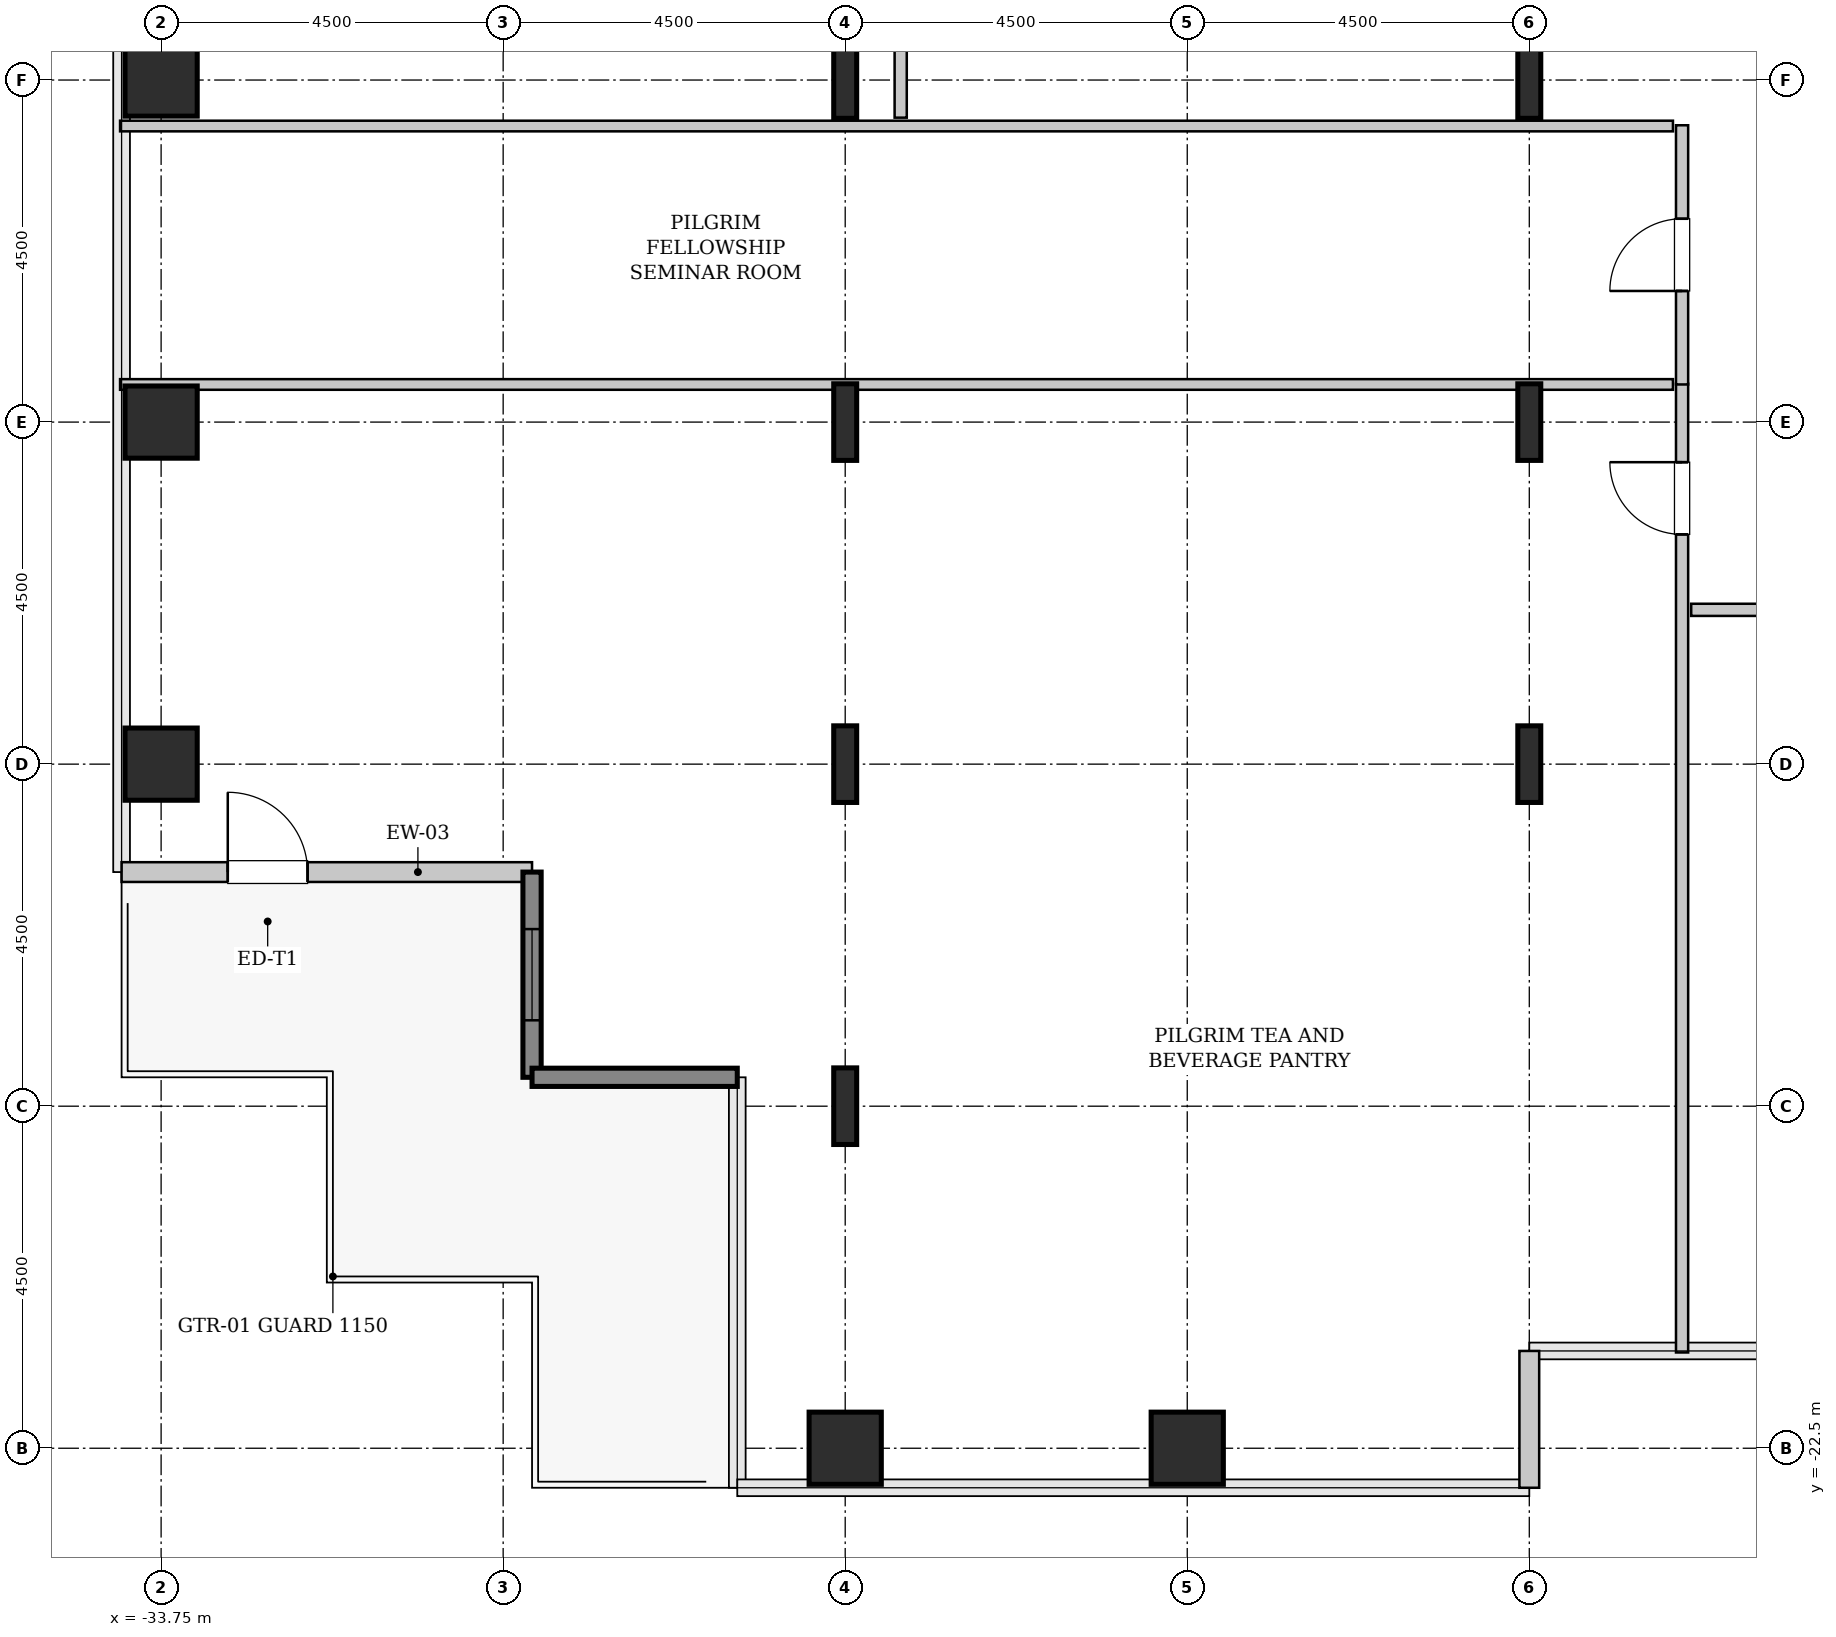
"""IFC4 building model, lengths in metres.
Left out: names, types, materials, properties, quantities, classifications, styles, units other than length and angle.
Written with IfcOpenShell. Run it as: python <this file> out.ifc"""

import sys

from ifc_helpers import new_model, si_unit, direction, frame, frame_2d, origin, origin_2d, place, context, subcontext, project, spatial, rectangle, hollow_rectangle, i_section, extrude, source, transform, mapped, element, fill, save


model = new_model("IFC4")
c1 = context("Model", 3, precision=1e-05, world=origin(), true_north=direction((0.0, 1.0)))
c2 = subcontext(c1, "Body", "Model", "MODEL_VIEW")
j1 = project(units=[si_unit("LENGTHUNIT", "METRE"), si_unit("PLANEANGLEUNIT", "RADIAN")], contexts=[c1])
p1 = place(None, origin())
s1 = spatial("IfcSite", under=j1, at=p1, CompositionType="ELEMENT")
p2 = place(p1, origin())
s2 = spatial("IfcBuilding", under=s1, at=p2, CompositionType="ELEMENT")
p3 = place(p2, frame((0.0, 0.0, 48.2)))
s3 = spatial("IfcBuildingStorey", under=s2, at=p3, CompositionType="ELEMENT", Elevation=48.2)
m1 = source(origin(), c2, "Body", "SweptSolid", [
    extrude(hollow_rectangle(XDim=0.95, YDim=0.95, WallThickness=0.045, InnerFilletRadius=0.045, OuterFilletRadius=0.09, at=origin_2d()), origin(), (0.0, 0.0, 1.0), 3.8),
])
for number, where, z_axis, x_axis in (
    (1, (-33.75, -13.5, 0.0), (0.0, 0.0, 1.0), (1.0, 0.0, 0.0)),
    (2, (-33.75, -9.0, 0.0), (0.0, 0.0, 1.0), (1.0, 0.0, 0.0)),
    (3, (-33.75, -4.5, 0.0), (0.0, 0.0, 1.0), (1.0, 0.0, 0.0)),
    (4, (-24.75, -22.5, 0.0), (0.0, 0.0, 1.0), (1.0, 0.0, 0.0)),
):
    element("IfcColumn", number, at=place(p3, frame(where, z_axis=z_axis, x_axis=x_axis)), inside=s3, PredefinedType="COLUMN", context=c2, shape_type="MappedRepresentation", body=[
        mapped(m1, transform((0.0, 0.0, 0.0), x_axis=(1.0, 0.0, 0.0), y_axis=(0.0, 1.0, 0.0), z_axis=(0.0, 0.0, 1.0), scale=1.0)),
    ])
m2 = source(origin(), c2, "Body", "SweptSolid", [
    extrude(i_section(OverallWidth=0.302, OverallDepth=1.008, WebThickness=0.021, FlangeThickness=0.04, FilletRadius=0.03, at=origin_2d()), origin(), (0.0, 0.0, 1.0), 3.8),
])
for number, where, z_axis, x_axis in (
    (5, (-24.75, -18.0, 0.0), (0.0, 0.0, 1.0), (1.0, 0.0, 0.0)),
    (6, (-24.75, -13.5, 0.0), (0.0, 0.0, 1.0), (1.0, 0.0, 0.0)),
    (7, (-24.75, -9.0, 0.0), (0.0, 0.0, 1.0), (1.0, 0.0, 0.0)),
    (8, (-24.75, -4.5, 0.0), (0.0, 0.0, 1.0), (1.0, 0.0, 0.0)),
):
    element("IfcColumn", number, at=place(p3, frame(where, z_axis=z_axis, x_axis=x_axis)), inside=s3, PredefinedType="COLUMN", context=c2, shape_type="MappedRepresentation", body=[
        mapped(m2, transform((0.0, 0.0, 0.0), x_axis=(1.0, 0.0, 0.0), y_axis=(0.0, 1.0, 0.0), z_axis=(0.0, 0.0, 1.0), scale=1.0)),
    ])
p4 = place(p3, frame((-20.25, -22.5, 0.0), z_axis=(0.0, 0.0, 1.0), x_axis=(1.0, 0.0, 0.0)))
e9 = element("IfcColumn", 9, at=p4, inside=s3, PredefinedType="COLUMN", context=c2, shape_type="MappedRepresentation", body=[
    mapped(m1, transform((0.0, 0.0, 0.0), x_axis=(1.0, 0.0, 0.0), y_axis=(0.0, 1.0, 0.0), z_axis=(0.0, 0.0, 1.0), scale=1.0)),
])
for number, where, z_axis, x_axis in (
    (10, (-15.75, -13.5, 0.0), (0.0, 0.0, 1.0), (1.0, 0.0, 0.0)),
    (11, (-15.75, -9.0, 0.0), (0.0, 0.0, 1.0), (1.0, 0.0, 0.0)),
    (12, (-15.75, -4.5, 0.0), (0.0, 0.0, 1.0), (1.0, 0.0, 0.0)),
):
    element("IfcColumn", number, at=place(p3, frame(where, z_axis=z_axis, x_axis=x_axis)), inside=s3, PredefinedType="COLUMN", context=c2, shape_type="MappedRepresentation", body=[
        mapped(m2, transform((0.0, 0.0, 0.0), x_axis=(1.0, 0.0, 0.0), y_axis=(0.0, 1.0, 0.0), z_axis=(0.0, 0.0, 1.0), scale=1.0)),
    ])
m3 = source(origin(), c2, "Body", "SweptSolid", [
    extrude(rectangle(XDim=5.4, YDim=0.26, at=frame_2d((2.7, 0.0))), origin(), (0.0, 0.0, 1.0), 3.55),
])
p5 = place(p3, frame((-34.27, -14.92, 0.0), z_axis=(0.0, 0.0, 1.0), x_axis=(1.0, 0.0, 0.0)))
e13 = element("IfcWall", 13, at=p5, inside=s3, PredefinedType="SOLIDWALL", context=c2, shape_type="MappedRepresentation", body=[
    mapped(m3, transform((0.0, 0.0, 0.0), x_axis=(1.0, 0.0, 0.0), y_axis=(0.0, 1.0, 0.0), z_axis=(0.0, 0.0, 1.0), scale=1.0)),
])
p6 = place(p5, frame((1.397, 0.0, 0.0)))
e14 = element("IfcOpeningElement", 14, at=p6, cuts=e13, PredefinedType="OPENING", context=c2, shape_type="SweptSolid", body=[
    extrude(rectangle(XDim=1.05, YDim=2.2, at=frame_2d((0.525, 1.1))), frame((0.0, 0.14, 0.0), z_axis=(0.0, -1.0, 0.0), x_axis=(1.0, 0.0, 0.0)), (0.0, 0.0, 1.0), 0.28),
])
m4 = source(origin(), c2, "Body", "SweptSolid", [
    extrude(rectangle(XDim=2.7, YDim=0.24, at=frame_2d((1.35, 0.0))), origin(), (0.0, 0.0, 1.0), 3.55),
])
p7 = place(p3, frame((-28.87, -14.92, 0.0), z_axis=(0.0, 0.0, 1.0), x_axis=(0.0, -1.0, 0.0)))
e15 = element("IfcWall", 15, at=p7, inside=s3, PredefinedType="SHEAR", context=c2, shape_type="MappedRepresentation", body=[
    mapped(m4, transform((0.0, 0.0, 0.0), x_axis=(1.0, 0.0, 0.0), y_axis=(0.0, 1.0, 0.0), z_axis=(0.0, 0.0, 1.0), scale=1.0)),
])
p8 = place(p7, frame((0.75, 0.0, 0.85)))
e16 = element("IfcOpeningElement", 16, at=p8, cuts=e15, PredefinedType="OPENING", context=c2, shape_type="SweptSolid", body=[
    extrude(rectangle(XDim=1.2, YDim=1.8, at=frame_2d((0.6, 0.9))), frame((0.0, 0.13, 0.0), z_axis=(0.0, -1.0, 0.0), x_axis=(1.0, 0.0, 0.0)), (0.0, 0.0, 1.0), 0.26),
])
p9 = place(p3, frame((-28.87, -17.62, 0.0), z_axis=(0.0, 0.0, 1.0), x_axis=(1.0, 0.0, 0.0)))
e17 = element("IfcWall", 17, at=p9, inside=s3, PredefinedType="SHEAR", context=c2, shape_type="MappedRepresentation", body=[
    mapped(m4, transform((0.0, 0.0, 0.0), x_axis=(1.0, 0.0, 0.0), y_axis=(0.0, 1.0, 0.0), z_axis=(0.0, 0.0, 1.0), scale=1.0)),
])
m5 = source(origin(), c2, "Body", "SweptSolid", [
    extrude(rectangle(XDim=1.8, YDim=0.26, at=frame_2d((0.9, 0.0))), origin(), (0.0, 0.0, 1.0), 3.55),
])
p10 = place(p3, frame((-15.75, -23.02, 0.0), z_axis=(0.0, 0.0, 1.0), x_axis=(0.0, 1.0, 0.0)))
e18 = element("IfcWall", 18, at=p10, inside=s3, PredefinedType="SOLIDWALL", context=c2, shape_type="MappedRepresentation", body=[
    mapped(m5, transform((0.0, 0.0, 0.0), x_axis=(1.0, 0.0, 0.0), y_axis=(0.0, 1.0, 0.0), z_axis=(0.0, 0.0, 1.0), scale=1.0)),
])
m6 = source(origin(), c2, "Body", "SweptSolid", [
    extrude(rectangle(XDim=12.745, YDim=0.16, at=frame_2d((6.373, 0.0))), origin(), (0.0, 0.0, 1.0), 3.535),
])
p11 = place(p3, frame((-13.74, -21.24, 0.0), z_axis=(0.0, 0.0, 1.0), x_axis=(0.0, 1.0, 0.0)))
e19 = element("IfcWall", 19, at=p11, inside=s3, PredefinedType="PARTITIONING", context=c2, shape_type="MappedRepresentation", body=[
    mapped(m6, transform((0.0, 0.0, 0.0), x_axis=(1.0, 0.0, 0.0), y_axis=(0.0, 1.0, 0.0), z_axis=(0.0, 0.0, 1.0), scale=1.0)),
])
p12 = place(p11, frame((10.762, 0.0, 0.0)))
e20 = element("IfcOpeningElement", 20, at=p12, cuts=e19, PredefinedType="OPENING", context=c2, shape_type="SweptSolid", body=[
    extrude(rectangle(XDim=0.95, YDim=2.1, at=frame_2d((0.475, 1.05))), frame((0.0, 0.09, 0.0), z_axis=(0.0, -1.0, 0.0), x_axis=(1.0, 0.0, 0.0)), (0.0, 0.0, 1.0), 0.18),
])
m7 = source(origin(), c2, "Body", "SweptSolid", [
    extrude(rectangle(XDim=20.43, YDim=0.14, at=frame_2d((10.215, 0.0))), origin(), (0.0, 0.0, 1.0), 2.825),
])
p13 = place(p3, frame((-34.29, -8.505, 0.0), z_axis=(0.0, 0.0, 1.0), x_axis=(1.0, 0.0, 0.0)))
e21 = element("IfcWall", 21, at=p13, inside=s3, PredefinedType="PARTITIONING", context=c2, shape_type="MappedRepresentation", body=[
    mapped(m7, transform((0.0, 0.0, 0.0), x_axis=(1.0, 0.0, 0.0), y_axis=(0.0, 1.0, 0.0), z_axis=(0.0, 0.0, 1.0), scale=1.0)),
])
m8 = source(origin(), c2, "Body", "SweptSolid", [
    extrude(rectangle(XDim=3.41, YDim=0.16, at=frame_2d((1.705, 0.0))), origin(), (0.0, 0.0, 1.0), 3.535),
])
p14 = place(p3, frame((-13.74, -8.505, 0.0), z_axis=(0.0, 0.0, 1.0), x_axis=(0.0, 1.0, 0.0)))
e22 = element("IfcWall", 22, at=p14, inside=s3, PredefinedType="PARTITIONING", context=c2, shape_type="MappedRepresentation", body=[
    mapped(m8, transform((0.0, 0.0, 0.0), x_axis=(1.0, 0.0, 0.0), y_axis=(0.0, 1.0, 0.0), z_axis=(0.0, 0.0, 1.0), scale=1.0)),
])
p15 = place(p14, frame((1.23, 0.0, 0.0)))
e23 = element("IfcOpeningElement", 23, at=p15, cuts=e22, PredefinedType="OPENING", context=c2, shape_type="SweptSolid", body=[
    extrude(rectangle(XDim=0.95, YDim=2.1, at=frame_2d((0.475, 1.05))), frame((0.0, 0.09, 0.0), z_axis=(0.0, -1.0, 0.0), x_axis=(1.0, 0.0, 0.0)), (0.0, 0.0, 1.0), 0.18),
])
m9 = source(origin(), c2, "Body", "SweptSolid", [
    extrude(rectangle(XDim=20.43, YDim=0.14, at=frame_2d((10.215, 0.0))), origin(), (0.0, 0.0, 1.0), 3.535),
])
p16 = place(p3, frame((-34.29, -5.105, 0.0), z_axis=(0.0, 0.0, 1.0), x_axis=(1.0, 0.0, 0.0)))
e24 = element("IfcWall", 24, at=p16, inside=s3, PredefinedType="PARTITIONING", context=c2, shape_type="MappedRepresentation", body=[
    mapped(m9, transform((0.0, 0.0, 0.0), x_axis=(1.0, 0.0, 0.0), y_axis=(0.0, 1.0, 0.0), z_axis=(0.0, 0.0, 1.0), scale=1.0)),
])
m10 = source(origin(), c2, "Body", "SweptSolid", [
    extrude(rectangle(XDim=9.68, YDim=0.16, at=frame_2d((4.84, 0.0))), origin(), (0.0, 0.0, 1.0), 3.535),
])
p17 = place(p3, frame((-24.02, -4.995, 0.0), z_axis=(0.0, 0.0, 1.0), x_axis=(0.0, 1.0, 0.0)))
e25 = element("IfcWall", 25, at=p17, inside=s3, PredefinedType="PARTITIONING", context=c2, shape_type="MappedRepresentation", body=[
    mapped(m10, transform((0.0, 0.0, 0.0), x_axis=(1.0, 0.0, 0.0), y_axis=(0.0, 1.0, 0.0), z_axis=(0.0, 0.0, 1.0), scale=1.0)),
])
p18 = place(p17, frame((2.27, 0.0, 0.0)))
e26 = element("IfcOpeningElement", 26, at=p18, cuts=e25, PredefinedType="OPENING", context=c2, shape_type="SweptSolid", body=[
    extrude(rectangle(XDim=0.95, YDim=2.1, at=frame_2d((0.475, 1.05))), frame((0.0, 0.09, 0.0), z_axis=(0.0, -1.0, 0.0), x_axis=(1.0, 0.0, 0.0)), (0.0, 0.0, 1.0), 0.18),
])
m11 = source(origin(), c2, "Body", "SweptSolid", [
    extrude(rectangle(XDim=5.025, YDim=0.16, at=frame_2d((2.513, 0.0))), origin(), (0.0, 0.0, 1.0), 3.535),
])
p19 = place(p3, frame((-13.62, -11.47, 0.0), z_axis=(0.0, 0.0, 1.0), x_axis=(1.0, 0.0, 0.0)))
e27 = element("IfcWall", 27, at=p19, inside=s3, PredefinedType="PARTITIONING", context=c2, shape_type="MappedRepresentation", body=[
    mapped(m11, transform((0.0, 0.0, 0.0), x_axis=(1.0, 0.0, 0.0), y_axis=(0.0, 1.0, 0.0), z_axis=(0.0, 0.0, 1.0), scale=1.0)),
])
p20 = place(p19, frame((2.038, 0.0, 0.0)))
e28 = element("IfcOpeningElement", 28, at=p20, cuts=e27, PredefinedType="OPENING", context=c2, shape_type="SweptSolid", body=[
    extrude(rectangle(XDim=0.95, YDim=2.1, at=frame_2d((0.475, 1.05))), frame((0.0, 0.09, 0.0), z_axis=(0.0, -1.0, 0.0), x_axis=(1.0, 0.0, 0.0)), (0.0, 0.0, 1.0), 0.18),
])
m12 = source(origin(), c2, "Body", "SweptSolid", [
    extrude(rectangle(XDim=1.05, YDim=2.2, at=frame_2d((0.525, 1.1))), frame((0.0, 0.025, 0.0), z_axis=(0.0, -1.0, 0.0), x_axis=(1.0, 0.0, 0.0)), (0.0, 0.0, 1.0), 0.05),
])
p21 = place(p6, origin())
e29 = element("IfcDoor", 29, at=p21, inside=s3, OperationType="SINGLE_SWING_LEFT", PredefinedType="DOOR", context=c2, shape_type="MappedRepresentation", body=[
    mapped(m12, transform((0.0, 0.0, 0.0), x_axis=(1.0, 0.0, 0.0), y_axis=(0.0, 1.0, 0.0), z_axis=(0.0, 0.0, 1.0), scale=1.0)),
])
fill(e14, e29)
m13 = source(origin(), c2, "Body", "SweptSolid", [
    extrude(rectangle(XDim=1.2, YDim=1.8, at=frame_2d((0.6, 0.9))), frame((0.0, 0.03, 0.0), z_axis=(0.0, -1.0, 0.0), x_axis=(1.0, 0.0, 0.0)), (0.0, 0.0, 1.0), 0.06),
])
p22 = place(p8, origin())
e30 = element("IfcWindow", 30, at=p22, inside=s3, PartitioningType="SINGLE_PANEL", PredefinedType="WINDOW", context=c2, shape_type="MappedRepresentation", body=[
    mapped(m13, transform((0.0, 0.0, 0.0), x_axis=(1.0, 0.0, 0.0), y_axis=(0.0, 1.0, 0.0), z_axis=(0.0, 0.0, 1.0), scale=1.0)),
])
fill(e16, e30)
m14 = source(origin(), c2, "Body", "SweptSolid", [
    extrude(rectangle(XDim=0.95, YDim=2.1, at=frame_2d((0.475, 1.05))), frame((0.0, 0.025, 0.0), z_axis=(0.0, -1.0, 0.0), x_axis=(1.0, 0.0, 0.0)), (0.0, 0.0, 1.0), 0.05),
])
p23 = place(p12, origin())
e31 = element("IfcDoor", 31, at=p23, inside=s3, OperationType="SINGLE_SWING_RIGHT", PredefinedType="DOOR", context=c2, shape_type="MappedRepresentation", body=[
    mapped(m14, transform((0.0, 0.0, 0.0), x_axis=(1.0, 0.0, 0.0), y_axis=(0.0, 1.0, 0.0), z_axis=(0.0, 0.0, 1.0), scale=1.0)),
])
fill(e20, e31)
p24 = place(p15, origin())
e32 = element("IfcDoor", 32, at=p24, inside=s3, OperationType="SINGLE_SWING_LEFT", PredefinedType="DOOR", context=c2, shape_type="MappedRepresentation", body=[
    mapped(m14, transform((0.0, 0.0, 0.0), x_axis=(1.0, 0.0, 0.0), y_axis=(0.0, 1.0, 0.0), z_axis=(0.0, 0.0, 1.0), scale=1.0)),
])
fill(e23, e32)
save(model, sys.argv[1])
